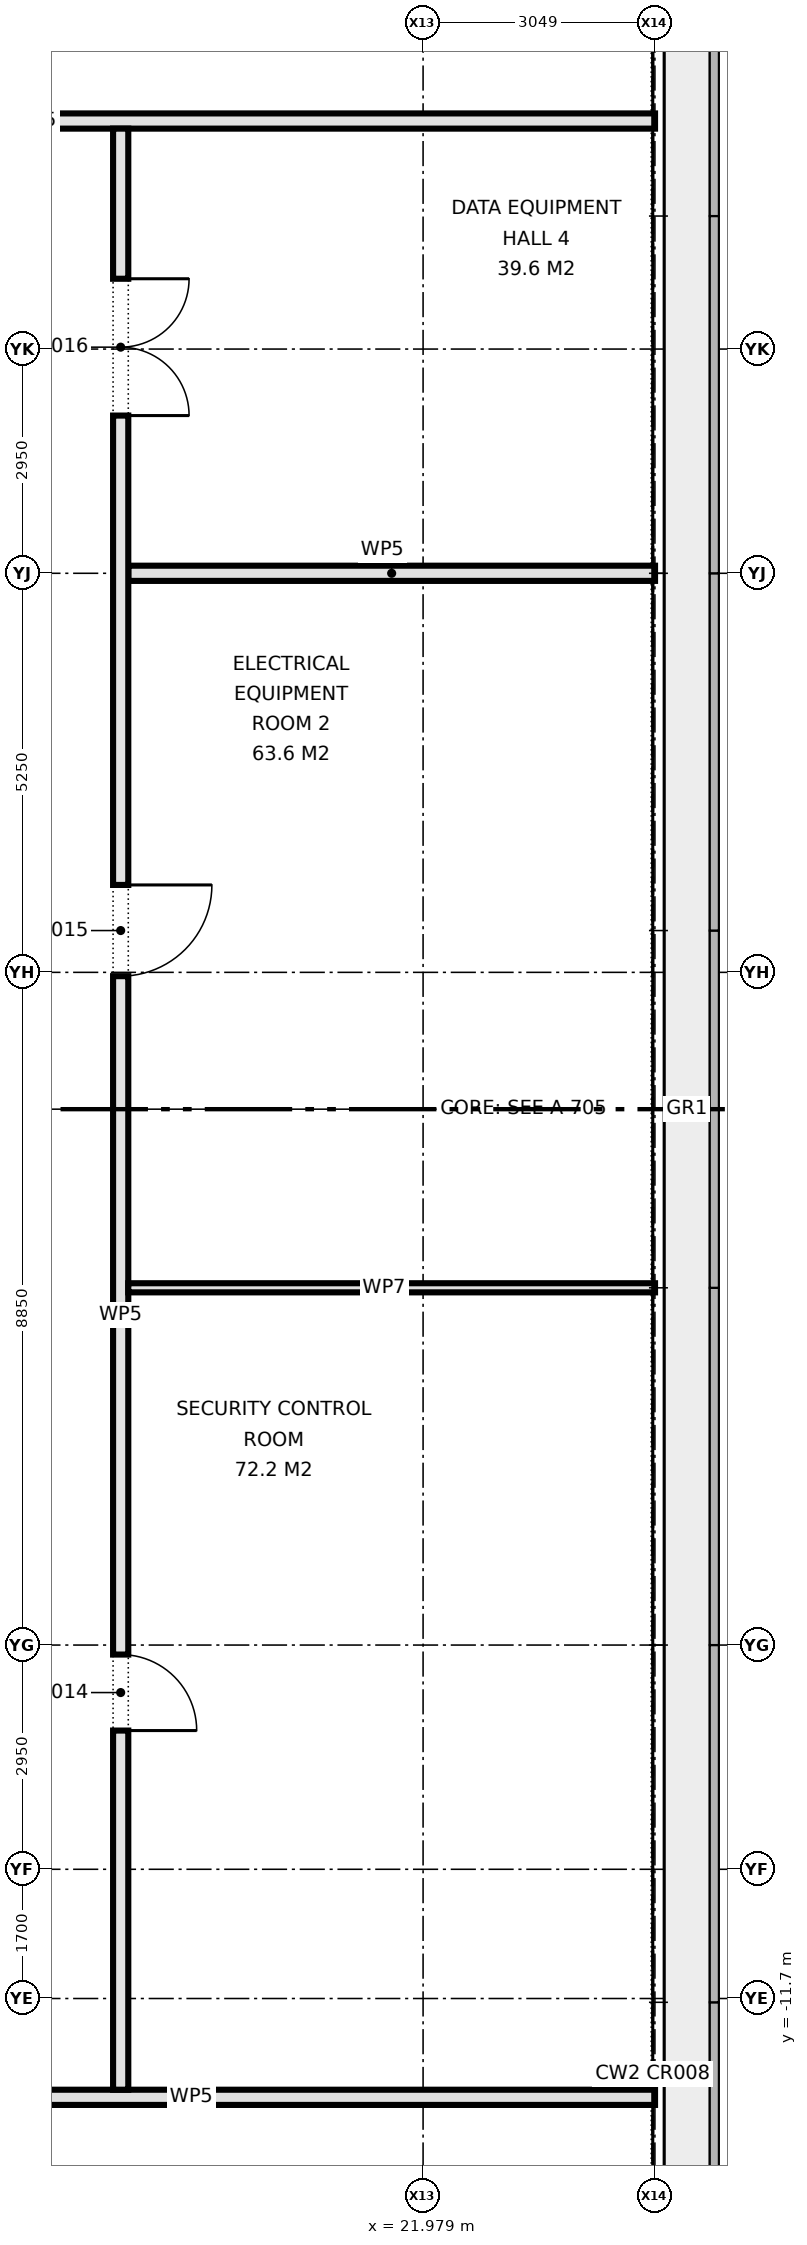
"""IFC4 building model, lengths in metres.
Left out: names, types, materials, properties, quantities, classifications, styles, units other than length and angle.
Written with IfcOpenShell. Run it as: python <this file> out.ifc"""

import sys

from ifc_helpers import new_model, si_unit, direction, frame, frame_2d, origin, place, context, subcontext, project, spatial, rectangle, extrude, element, fill, save


model = new_model("IFC4")
c1 = context("Model", 3, precision=1e-05, world=origin(), true_north=direction((0.0, 1.0)))
c2 = subcontext(c1, "Body", "Model", "MODEL_VIEW")
j1 = project(units=[si_unit("LENGTHUNIT", "METRE"), si_unit("PLANEANGLEUNIT", "RADIAN")], contexts=[c1])
p1 = place(None, origin())
s1 = spatial("IfcSite", under=j1, at=p1, CompositionType="ELEMENT")
p2 = place(p1, origin())
s2 = spatial("IfcBuilding", under=s1, at=p2, CompositionType="ELEMENT")
p3 = place(p2, frame((0.0, 0.0, 25.7)))
s3 = spatial("IfcBuildingStorey", under=s2, at=p3, CompositionType="ELEMENT", Elevation=25.7)
p4 = place(p3, frame((-25.03, -13.0, 0.0), z_axis=(0.0, 0.0, 1.0), x_axis=(1.0, 0.0, 0.0)))
e1 = element("IfcWall", 1, at=p4, inside=s3, PredefinedType="PARTITIONING", context=c2, shape_type="SweptSolid", body=[
    extrude(rectangle(XDim=50.06, YDim=0.2, at=frame_2d((25.03, 0.0))), origin(), (0.0, 0.0, 1.0), 4.575),
])
p5 = place(p4, frame((9.25, 0.0, 0.0)))
e2 = element("IfcOpeningElement", 2, at=p5, cuts=e1, PredefinedType="OPENING", context=c2, shape_type="SweptSolid", body=[
    extrude(rectangle(XDim=1.8, YDim=2.1, at=frame_2d((0.9, 1.05))), frame((0.0, 0.11, 0.0), z_axis=(0.0, -1.0, 0.0), x_axis=(1.0, 0.0, 0.0)), (0.0, 0.0, 1.0), 0.22),
])
p6 = place(p4, frame((17.08, 0.0, 0.0)))
e3 = element("IfcOpeningElement", 3, at=p6, cuts=e1, PredefinedType="OPENING", context=c2, shape_type="SweptSolid", body=[
    extrude(rectangle(XDim=1.8, YDim=2.1, at=frame_2d((0.9, 1.05))), frame((0.0, 0.11, 0.0), z_axis=(0.0, -1.0, 0.0), x_axis=(1.0, 0.0, 0.0)), (0.0, 0.0, 1.0), 0.22),
])
p7 = place(p4, frame((36.06, 0.0, 0.0)))
e4 = element("IfcOpeningElement", 4, at=p7, cuts=e1, PredefinedType="OPENING", context=c2, shape_type="SweptSolid", body=[
    extrude(rectangle(XDim=1.8, YDim=2.1, at=frame_2d((0.9, 1.05))), frame((0.0, 0.11, 0.0), z_axis=(0.0, -1.0, 0.0), x_axis=(1.0, 0.0, 0.0)), (0.0, 0.0, 1.0), 0.22),
])
p8 = place(p4, frame((23.68, 0.0, 0.0)))
e5 = element("IfcOpeningElement", 5, at=p8, cuts=e1, PredefinedType="OPENING", context=c2, shape_type="SweptSolid", body=[
    extrude(rectangle(XDim=1.0, YDim=2.1, at=frame_2d((0.5, 1.05))), frame((0.0, 0.11, 0.0), z_axis=(0.0, -1.0, 0.0), x_axis=(1.0, 0.0, 0.0)), (0.0, 0.0, 1.0), 0.22),
])
p9 = place(p4, frame((26.68, 0.0, 0.0)))
e6 = element("IfcOpeningElement", 6, at=p9, cuts=e1, PredefinedType="OPENING", context=c2, shape_type="SweptSolid", body=[
    extrude(rectangle(XDim=1.0, YDim=2.1, at=frame_2d((0.5, 1.05))), frame((0.0, 0.11, 0.0), z_axis=(0.0, -1.0, 0.0), x_axis=(1.0, 0.0, 0.0)), (0.0, 0.0, 1.0), 0.22),
])
p10 = place(p4, frame((29.28, 0.0, 0.0)))
e7 = element("IfcOpeningElement", 7, at=p10, cuts=e1, PredefinedType="OPENING", context=c2, shape_type="SweptSolid", body=[
    extrude(rectangle(XDim=1.0, YDim=2.1, at=frame_2d((0.5, 1.05))), frame((0.0, 0.11, 0.0), z_axis=(0.0, -1.0, 0.0), x_axis=(1.0, 0.0, 0.0)), (0.0, 0.0, 1.0), 0.22),
])
p11 = place(p3, frame((18.1, 7.05, 0.0), z_axis=(0.0, 0.0, 1.0), x_axis=(1.0, 0.0, 0.0)))
e8 = element("IfcWall", 8, at=p11, inside=s3, PredefinedType="PARTITIONING", context=c2, shape_type="SweptSolid", body=[
    extrude(rectangle(XDim=6.93, YDim=0.2, at=frame_2d((3.465, 0.0))), origin(), (0.0, 0.0, 1.0), 4.575),
])
p12 = place(p3, frame((-25.03, 13.0, 0.0), z_axis=(0.0, 0.0, 1.0), x_axis=(1.0, 0.0, 0.0)))
e9 = element("IfcWall", 9, at=p12, inside=s3, PredefinedType="PARTITIONING", context=c2, shape_type="SweptSolid", body=[
    extrude(rectangle(XDim=50.06, YDim=0.2, at=frame_2d((25.03, 0.0))), origin(), (0.0, 0.0, 1.0), 4.575),
])
p13 = place(p12, frame((15.855, 0.0, 0.0)))
e10 = element("IfcOpeningElement", 10, at=p13, cuts=e9, PredefinedType="OPENING", context=c2, shape_type="SweptSolid", body=[
    extrude(rectangle(XDim=1.8, YDim=2.1, at=frame_2d((0.9, 1.05))), frame((0.0, 0.11, 0.0), z_axis=(0.0, -1.0, 0.0), x_axis=(1.0, 0.0, 0.0)), (0.0, 0.0, 1.0), 0.22),
])
p14 = place(p12, frame((8.03, 0.0, 0.0)))
e11 = element("IfcOpeningElement", 11, at=p14, cuts=e9, PredefinedType="OPENING", context=c2, shape_type="SweptSolid", body=[
    extrude(rectangle(XDim=1.8, YDim=2.1, at=frame_2d((0.9, 1.05))), frame((0.0, 0.11, 0.0), z_axis=(0.0, -1.0, 0.0), x_axis=(1.0, 0.0, 0.0)), (0.0, 0.0, 1.0), 0.22),
])
p15 = place(p12, frame((31.96, 0.0, 0.0)))
e12 = element("IfcOpeningElement", 12, at=p15, cuts=e9, PredefinedType="OPENING", context=c2, shape_type="SweptSolid", body=[
    extrude(rectangle(XDim=1.8, YDim=2.1, at=frame_2d((0.9, 1.05))), frame((0.0, 0.11, 0.0), z_axis=(0.0, -1.0, 0.0), x_axis=(1.0, 0.0, 0.0)), (0.0, 0.0, 1.0), 0.22),
])
p16 = place(p3, frame((18.0, -12.9, 0.0), z_axis=(0.0, 0.0, 1.0), x_axis=(0.0, 1.0, 0.0)))
e13 = element("IfcWall", 13, at=p16, inside=s3, PredefinedType="PARTITIONING", context=c2, shape_type="SweptSolid", body=[
    extrude(rectangle(XDim=25.8, YDim=0.2, at=frame_2d((12.9, 0.0))), origin(), (0.0, 0.0, 1.0), 4.575),
])
p17 = place(p16, frame((4.725, 0.0, 0.0)))
e14 = element("IfcOpeningElement", 14, at=p17, cuts=e13, PredefinedType="OPENING", context=c2, shape_type="SweptSolid", body=[
    extrude(rectangle(XDim=1.0, YDim=2.1, at=frame_2d((0.5, 1.05))), frame((0.0, 0.11, 0.0), z_axis=(0.0, -1.0, 0.0), x_axis=(1.0, 0.0, 0.0)), (0.0, 0.0, 1.0), 0.22),
])
p18 = place(p16, frame((14.65, 0.0, 0.0)))
e15 = element("IfcOpeningElement", 15, at=p18, cuts=e13, PredefinedType="OPENING", context=c2, shape_type="SweptSolid", body=[
    extrude(rectangle(XDim=1.2, YDim=2.1, at=frame_2d((0.6, 1.05))), frame((0.0, 0.11, 0.0), z_axis=(0.0, -1.0, 0.0), x_axis=(1.0, 0.0, 0.0)), (0.0, 0.0, 1.0), 0.22),
])
p19 = place(p16, frame((22.025, 0.0, 0.0)))
e16 = element("IfcOpeningElement", 16, at=p19, cuts=e13, PredefinedType="OPENING", context=c2, shape_type="SweptSolid", body=[
    extrude(rectangle(XDim=1.8, YDim=2.1, at=frame_2d((0.9, 1.05))), frame((0.0, 0.11, 0.0), z_axis=(0.0, -1.0, 0.0), x_axis=(1.0, 0.0, 0.0)), (0.0, 0.0, 1.0), 0.22),
])
p20 = place(p3, frame((18.1, -2.35, 0.0), z_axis=(0.0, 0.0, 1.0), x_axis=(1.0, 0.0, 0.0)))
e17 = element("IfcWall", 17, at=p20, inside=s3, PredefinedType="PARTITIONING", context=c2, shape_type="SweptSolid", body=[
    extrude(rectangle(XDim=6.93, YDim=0.12, at=frame_2d((3.465, 0.0))), origin(), (0.0, 0.0, 1.0), 4.575),
])
p21 = place(p17, frame((1.0, 0.0, 0.0), z_axis=(0.0, 0.0, 1.0), x_axis=(-1.0, 0.0, 0.0)))
e18 = element("IfcDoor", 18, at=p21, inside=s3, OperationType="SINGLE_SWING_RIGHT", PredefinedType="DOOR", context=c2, shape_type="SweptSolid", body=[
    extrude(rectangle(XDim=1.0, YDim=2.1, at=frame_2d((0.5, 1.05))), frame((0.0, 0.025, 0.0), z_axis=(0.0, -1.0, 0.0), x_axis=(1.0, 0.0, 0.0)), (0.0, 0.0, 1.0), 0.05),
])
fill(e14, e18)
p22 = place(p18, frame((1.2, 0.0, 0.0), z_axis=(0.0, 0.0, 1.0), x_axis=(-1.0, 0.0, 0.0)))
e19 = element("IfcDoor", 19, at=p22, inside=s3, OperationType="SINGLE_SWING_LEFT", PredefinedType="DOOR", context=c2, shape_type="SweptSolid", body=[
    extrude(rectangle(XDim=1.2, YDim=2.1, at=frame_2d((0.6, 1.05))), frame((0.0, 0.025, 0.0), z_axis=(0.0, -1.0, 0.0), x_axis=(1.0, 0.0, 0.0)), (0.0, 0.0, 1.0), 0.05),
])
fill(e15, e19)
p23 = place(p19, frame((1.8, 0.0, 0.0), z_axis=(0.0, 0.0, 1.0), x_axis=(-1.0, 0.0, 0.0)))
e20 = element("IfcDoor", 20, at=p23, inside=s3, OperationType="DOUBLE_DOOR_SINGLE_SWING", PredefinedType="DOOR", context=c2, shape_type="SweptSolid", body=[
    extrude(rectangle(XDim=1.8, YDim=2.1, at=frame_2d((0.9, 1.05))), frame((0.0, 0.025, 0.0), z_axis=(0.0, -1.0, 0.0), x_axis=(1.0, 0.0, 0.0)), (0.0, 0.0, 1.0), 0.05),
])
fill(e16, e20)
save(model, sys.argv[1])
